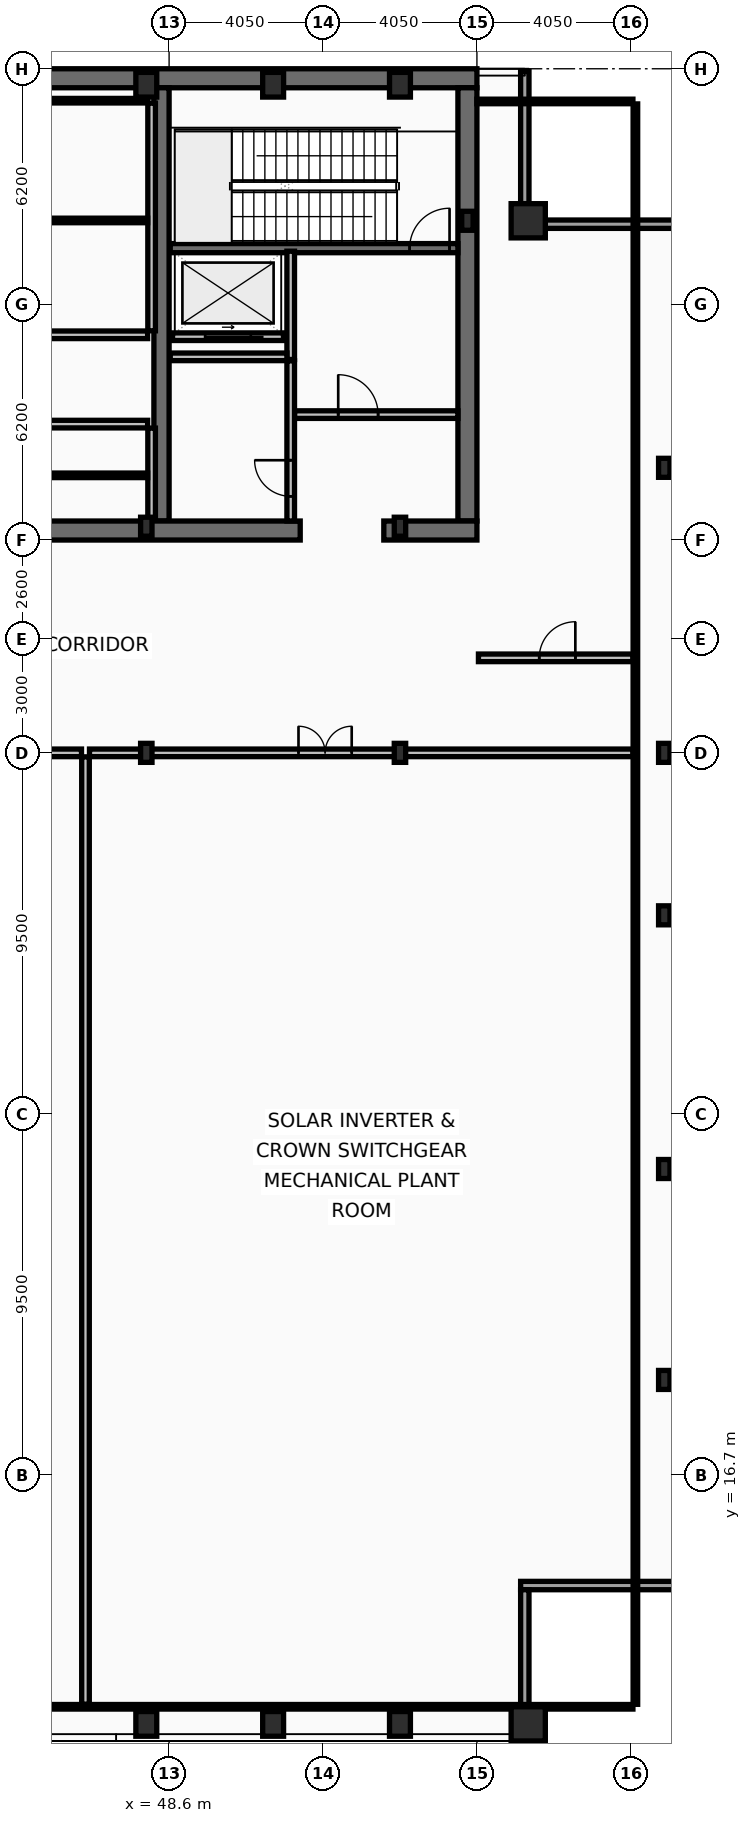
"""IFC4 building model, lengths in metres.
Left out: names, types, materials, properties, quantities, classifications, styles, units other than length and angle.
Written with IfcOpenShell. Run it as: python <this file> out.ifc"""

import sys

from ifc_helpers import new_model, si_unit, direction, frame, frame_2d, origin, origin_2d, place, context, subcontext, project, spatial, rectangle, hollow_rectangle, i_section, extrude, element, fill, save


model = new_model("IFC4")
c1 = context("Model", 3, precision=1e-05, world=origin(), true_north=direction((0.0, 1.0)))
c2 = subcontext(c1, "Body", "Model", "MODEL_VIEW")
j1 = project(units=[si_unit("LENGTHUNIT", "METRE"), si_unit("PLANEANGLEUNIT", "RADIAN")], contexts=[c1])
p1 = place(None, origin())
s1 = spatial("IfcSite", under=j1, at=p1, CompositionType="ELEMENT")
p2 = place(p1, origin())
s2 = spatial("IfcBuilding", under=s1, at=p2, CompositionType="ELEMENT")
p3 = place(p2, frame((0.0, 0.0, 373.0)))
s3 = spatial("IfcBuildingStorey", under=s2, at=p3, CompositionType="ELEMENT", Elevation=373.0)
p4 = place(p3, frame((16.2, 53.45, 0.0), z_axis=(0.0, 0.0, 1.0), x_axis=(1.0, 0.0, 0.0)))
e1 = element("IfcWall", 1, at=p4, inside=s3, PredefinedType="SHEAR", context=c2, shape_type="SweptSolid", body=[
    extrude(rectangle(XDim=40.5, YDim=0.5, at=frame_2d((20.25, 0.0))), origin(), (0.0, 0.0, 1.0), 5.4),
])
p5 = place(p3, frame((56.45, 53.2, 0.0), z_axis=(0.0, 0.0, 1.0), x_axis=(0.0, -1.0, 0.0)))
e2 = element("IfcWall", 2, at=p5, inside=s3, PredefinedType="SHEAR", context=c2, shape_type="SweptSolid", body=[
    extrude(rectangle(XDim=11.4, YDim=0.5, at=frame_2d((5.7, 0.0))), origin(), (0.0, 0.0, 1.0), 5.4),
])
p6 = place(p3, frame((48.4, 41.8, 0.0), z_axis=(0.0, 0.0, 1.0), x_axis=(0.0, 1.0, 0.0)))
e3 = element("IfcWall", 3, at=p6, inside=s3, PredefinedType="SHEAR", context=c2, shape_type="SweptSolid", body=[
    extrude(rectangle(XDim=11.4, YDim=0.4, at=frame_2d((5.7, 0.0))), origin(), (0.0, 0.0, 1.0), 5.4),
])
p7 = place(p3, frame((52.05, 41.55, 0.0), z_axis=(0.0, 0.0, 1.0), x_axis=(-1.0, 0.0, 0.0)))
e4 = element("IfcWall", 4, at=p7, inside=s3, PredefinedType="SHEAR", context=c2, shape_type="SweptSolid", body=[
    extrude(rectangle(XDim=11.3, YDim=0.5, at=frame_2d((5.65, 0.0))), origin(), (0.0, 0.0, 1.0), 5.4),
])
p8 = place(p3, frame((56.7, 41.55, 0.0), z_axis=(0.0, 0.0, 1.0), x_axis=(-1.0, 0.0, 0.0)))
e5 = element("IfcWall", 5, at=p8, inside=s3, PredefinedType="SHEAR", context=c2, shape_type="SweptSolid", body=[
    extrude(rectangle(XDim=2.45, YDim=0.5, at=frame_2d((1.225, 0.0))), origin(), (0.0, 0.0, 1.0), 5.4),
])
p9 = place(p3, frame((48.63, 48.98, 0.0), z_axis=(0.0, 0.0, 1.0), x_axis=(1.0, 0.0, 0.0)))
e6 = element("IfcWall", 6, at=p9, inside=s3, PredefinedType="SHEAR", context=c2, shape_type="SweptSolid", body=[
    extrude(rectangle(XDim=7.57, YDim=0.24, at=frame_2d((3.785, 0.0))), origin(), (0.0, 0.0, 1.0), 5.4),
])
p10 = place(p9, frame((6.3, 0.0, 0.0)))
e7 = element("IfcOpeningElement", 7, at=p10, cuts=e6, PredefinedType="OPENING", context=c2, shape_type="SweptSolid", body=[
    extrude(rectangle(XDim=1.05, YDim=2.15, at=frame_2d((0.525, 1.075))), frame((0.0, 0.13, 0.0), z_axis=(0.0, -1.0, 0.0), x_axis=(1.0, 0.0, 0.0)), (0.0, 0.0, 1.0), 0.26),
])
for number, where, z_axis, x_axis in (
    (8, (58.05, 10.15, 0.0), (0.0, 0.0, 1.0), (1.0, 0.0, 0.0)),
    (9, (58.05, 49.7, 0.0), (0.0, 0.0, 1.0), (1.0, 0.0, 0.0)),
):
    element("IfcColumn", number, at=place(p3, frame(where, z_axis=z_axis, x_axis=x_axis)), inside=s3, PredefinedType="COLUMN", context=c2, shape_type="SweptSolid", body=[
        extrude(hollow_rectangle(XDim=0.9, YDim=0.9, WallThickness=0.05, at=origin_2d()), origin(), (0.0, 0.0, 1.0), 5.6),
    ])
for number, where, z_axis, x_axis in (
    (10, (48.0, 10.15, 0.0), (0.0, 0.0, 1.0), (1.0, 0.0, 0.0)),
    (11, (51.337, 10.15, 0.0), (0.0, 0.0, 1.0), (1.0, 0.0, 0.0)),
    (12, (54.675, 10.15, 0.0), (0.0, 0.0, 1.0), (1.0, 0.0, 0.0)),
    (13, (48.0, 53.28, 0.0), (0.0, 0.0, 1.0), (1.0, 0.0, 0.0)),
    (14, (51.337, 53.28, 0.0), (0.0, 0.0, 1.0), (1.0, 0.0, 0.0)),
    (15, (54.675, 53.28, 0.0), (0.0, 0.0, 1.0), (1.0, 0.0, 0.0)),
):
    element("IfcColumn", number, at=place(p3, frame(where, z_axis=z_axis, x_axis=x_axis)), inside=s3, PredefinedType="COLUMN", context=c2, shape_type="SweptSolid", body=[
        extrude(hollow_rectangle(XDim=0.55, YDim=0.65, WallThickness=0.04, at=origin_2d()), origin(), (0.0, 0.0, 1.0), 5.6),
    ])
for number, where, z_axis, x_axis in (
    (16, (61.63, 19.2, 0.0), (0.0, 0.0, 1.0), (1.0, 0.0, 0.0)),
    (17, (61.63, 24.75, 0.0), (0.0, 0.0, 1.0), (1.0, 0.0, 0.0)),
    (18, (61.63, 31.425, 0.0), (0.0, 0.0, 1.0), (1.0, 0.0, 0.0)),
    (19, (61.63, 35.7, 0.0), (0.0, 0.0, 1.0), (1.0, 0.0, 0.0)),
    (20, (61.63, 43.2, 0.0), (0.0, 0.0, 1.0), (1.0, 0.0, 0.0)),
    (21, (56.45, 49.7, 0.0), (0.0, 0.0, 1.0), (1.0, 0.0, 0.0)),
    (22, (48.0, 35.7, 0.0), (0.0, 0.0, 1.0), (1.0, 0.0, 0.0)),
    (23, (48.0, 41.65, 0.0), (0.0, 0.0, 1.0), (1.0, 0.0, 0.0)),
    (24, (54.675, 35.7, 0.0), (0.0, 0.0, 1.0), (1.0, 0.0, 0.0)),
    (25, (54.675, 41.65, 0.0), (0.0, 0.0, 1.0), (1.0, 0.0, 0.0)),
):
    element("IfcColumn", number, at=place(p3, frame(where, z_axis=z_axis, x_axis=x_axis)), inside=s3, PredefinedType="COLUMN", context=c2, shape_type="SweptSolid", body=[
        extrude(i_section(OverallWidth=0.3, OverallDepth=0.5, WebThickness=0.014, FlangeThickness=0.028, at=origin_2d()), origin(), (0.0, 0.0, 1.0), 5.6),
    ])
p11 = place(p3, frame((57.96, 53.63, 0.0), z_axis=(0.0, 0.0, 1.0), x_axis=(0.0, -1.0, 0.0)))
e26 = element("IfcWall", 26, at=p11, inside=s3, PredefinedType="SOLIDWALL", context=c2, shape_type="SweptSolid", body=[
    extrude(rectangle(XDim=3.91, YDim=0.22, at=frame_2d((1.955, 0.0))), origin(), (0.0, 0.0, 1.0), 4.84),
])
for number, where, z_axis, x_axis in (
    (27, (57.85, 49.61, 0.0), (0.0, 0.0, 1.0), (1.0, 0.0, 0.0)),
    (28, (61.98, 13.79, 0.0), (0.0, 0.0, 1.0), (-1.0, 0.0, 0.0)),
):
    element("IfcWall", number, at=place(p3, frame(where, z_axis=z_axis, x_axis=x_axis)), inside=s3, PredefinedType="SOLIDWALL", context=c2, shape_type="SweptSolid", body=[
        extrude(rectangle(XDim=4.13, YDim=0.22, at=frame_2d((2.065, 0.0))), origin(), (0.0, 0.0, 1.0), 4.84),
    ])
p12 = place(p3, frame((57.96, 13.68, 0.0), z_axis=(0.0, 0.0, 1.0), x_axis=(0.0, -1.0, 0.0)))
e29 = element("IfcWall", 29, at=p12, inside=s3, PredefinedType="SOLIDWALL", context=c2, shape_type="SweptSolid", body=[
    extrude(rectangle(XDim=3.91, YDim=0.22, at=frame_2d((1.955, 0.0))), origin(), (0.0, 0.0, 1.0), 4.84),
])
p13 = place(p3, frame((51.61, 46.65, 0.0), z_axis=(0.0, 0.0, 1.0), x_axis=(-1.0, 0.0, 0.0)))
e30 = element("IfcWall", 30, at=p13, inside=s3, PredefinedType="PARTITIONING", context=c2, shape_type="SweptSolid", body=[
    extrude(rectangle(XDim=2.92, YDim=0.2, at=frame_2d((1.46, 0.0))), origin(), (0.0, 0.0, 1.0), 5.4),
])
p14 = place(p13, frame((0.86, 0.0, 0.0)))
e31 = element("IfcOpeningElement", 31, at=p14, cuts=e30, PredefinedType="OPENING", context=c2, shape_type="SweptSolid", body=[
    extrude(rectangle(XDim=1.2, YDim=2.18, at=frame_2d((0.6, 1.09))), frame((0.0, 0.11, 0.0), z_axis=(0.0, -1.0, 0.0), x_axis=(1.0, 0.0, 0.0)), (0.0, 0.0, 1.0), 0.22),
])
p15 = place(p3, frame((51.8, 46.05, 0.0), z_axis=(0.0, 0.0, 1.0), x_axis=(0.0, 1.0, 0.0)))
e32 = element("IfcWall", 32, at=p15, inside=s3, PredefinedType="PARTITIONING", context=c2, shape_type="SweptSolid", body=[
    extrude(rectangle(XDim=2.85, YDim=0.2, at=frame_2d((1.425, 0.0))), origin(), (0.0, 0.0, 1.0), 5.4),
])
p16 = place(p3, frame((51.9, 44.6, 0.0), z_axis=(0.0, 0.0, 1.0), x_axis=(1.0, 0.0, 0.0)))
e33 = element("IfcWall", 33, at=p16, inside=s3, PredefinedType="PARTITIONING", context=c2, shape_type="SweptSolid", body=[
    extrude(rectangle(XDim=4.3, YDim=0.2, at=frame_2d((2.15, 0.0))), origin(), (0.0, 0.0, 1.0), 5.4),
])
p17 = place(p16, frame((1.15, 0.0, 0.0)))
e34 = element("IfcOpeningElement", 34, at=p17, cuts=e33, PredefinedType="OPENING", context=c2, shape_type="SweptSolid", body=[
    extrude(rectangle(XDim=1.05, YDim=2.15, at=frame_2d((0.525, 1.075))), frame((0.0, 0.11, 0.0), z_axis=(0.0, -1.0, 0.0), x_axis=(1.0, 0.0, 0.0)), (0.0, 0.0, 1.0), 0.22),
])
p18 = place(p3, frame((48.63, 46.12, 0.0), z_axis=(0.0, 0.0, 1.0), x_axis=(1.0, 0.0, 0.0)))
e35 = element("IfcWall", 35, at=p18, inside=s3, PredefinedType="PARTITIONING", context=c2, shape_type="SweptSolid", body=[
    extrude(rectangle(XDim=3.07, YDim=0.2, at=frame_2d((1.535, 0.0))), origin(), (0.0, 0.0, 1.0), 5.4),
])
p19 = place(p3, frame((51.8, 41.8, 0.0), z_axis=(0.0, 0.0, 1.0), x_axis=(0.0, 1.0, 0.0)))
e36 = element("IfcWall", 36, at=p19, inside=s3, PredefinedType="PARTITIONING", context=c2, shape_type="SweptSolid", body=[
    extrude(rectangle(XDim=4.215, YDim=0.2, at=frame_2d((2.107, 0.0))), origin(), (0.0, 0.0, 1.0), 5.4),
])
p20 = place(p19, frame((0.65, 0.0, 0.0)))
e37 = element("IfcOpeningElement", 37, at=p20, cuts=e36, PredefinedType="OPENING", context=c2, shape_type="SweptSolid", body=[
    extrude(rectangle(XDim=0.95, YDim=2.1, at=frame_2d((0.475, 1.05))), frame((0.0, 0.11, 0.0), z_axis=(0.0, -1.0, 0.0), x_axis=(1.0, 0.0, 0.0)), (0.0, 0.0, 1.0), 0.22),
])
p21 = place(p3, frame((48.14, 46.805, 0.0), z_axis=(0.0, 0.0, 1.0), x_axis=(0.0, 1.0, 0.0)))
e38 = element("IfcWall", 38, at=p21, inside=s3, PredefinedType="PARTITIONING", context=c2, shape_type="SweptSolid", body=[
    extrude(rectangle(XDim=5.99, YDim=0.2, at=frame_2d((2.995, 0.0))), origin(), (0.0, 0.0, 1.0), 5.4),
])
p22 = place(p3, frame((40.685, 52.86, 0.0), z_axis=(0.0, 0.0, 1.0), x_axis=(1.0, 0.0, 0.0)))
e39 = element("IfcWall", 39, at=p22, inside=s3, PredefinedType="PARTITIONING", context=c2, shape_type="SweptSolid", body=[
    extrude(rectangle(XDim=7.35, YDim=0.12, at=frame_2d((3.675, 0.0))), origin(), (0.0, 0.0, 1.0), 5.4),
])
p23 = place(p3, frame((40.685, 49.709, 0.0), z_axis=(0.0, 0.0, 1.0), x_axis=(1.0, 0.0, 0.0)))
e40 = element("IfcWall", 40, at=p23, inside=s3, PredefinedType="PARTITIONING", context=c2, shape_type="SweptSolid", body=[
    extrude(rectangle(XDim=7.35, YDim=0.12, at=frame_2d((3.675, 0.0))), origin(), (0.0, 0.0, 1.0), 5.4),
])
p24 = place(p23, frame((2.4, 0.0, 0.0)))
e41 = element("IfcOpeningElement", 41, at=p24, cuts=e40, PredefinedType="OPENING", context=c2, shape_type="SweptSolid", body=[
    extrude(rectangle(XDim=0.9, YDim=2.05, at=frame_2d((0.45, 1.025))), frame((0.0, 0.07, 0.0), z_axis=(0.0, -1.0, 0.0), x_axis=(1.0, 0.0, 0.0)), (0.0, 0.0, 1.0), 0.14),
])
p25 = place(p3, frame((40.685, 46.7, 0.0), z_axis=(0.0, 0.0, 1.0), x_axis=(1.0, 0.0, 0.0)))
e42 = element("IfcWall", 42, at=p25, inside=s3, PredefinedType="PARTITIONING", context=c2, shape_type="SweptSolid", body=[
    extrude(rectangle(XDim=7.35, YDim=0.2, at=frame_2d((3.675, 0.0))), origin(), (0.0, 0.0, 1.0), 5.4),
])
p26 = place(p25, frame((2.4, 0.0, 0.0)))
e43 = element("IfcOpeningElement", 43, at=p26, cuts=e42, PredefinedType="OPENING", context=c2, shape_type="SweptSolid", body=[
    extrude(rectangle(XDim=0.95, YDim=2.1, at=frame_2d((0.475, 1.05))), frame((0.0, 0.11, 0.0), z_axis=(0.0, -1.0, 0.0), x_axis=(1.0, 0.0, 0.0)), (0.0, 0.0, 1.0), 0.22),
])
p27 = place(p3, frame((48.14, 41.85, 0.0), z_axis=(0.0, 0.0, 1.0), x_axis=(0.0, 1.0, 0.0)))
e44 = element("IfcWall", 44, at=p27, inside=s3, PredefinedType="PARTITIONING", context=c2, shape_type="SweptSolid", body=[
    extrude(rectangle(XDim=2.395, YDim=0.2, at=frame_2d((1.198, 0.0))), origin(), (0.0, 0.0, 1.0), 5.4),
])
p28 = place(p3, frame((40.755, 43.002, 0.0), z_axis=(0.0, 0.0, 1.0), x_axis=(1.0, 0.0, 0.0)))
e45 = element("IfcWall", 45, at=p28, inside=s3, PredefinedType="PARTITIONING", context=c2, shape_type="SweptSolid", body=[
    extrude(rectangle(XDim=7.28, YDim=0.12, at=frame_2d((3.64, 0.0))), origin(), (0.0, 0.0, 1.0), 5.4),
])
p29 = place(p28, frame((2.4, 0.0, 0.0)))
e46 = element("IfcOpeningElement", 46, at=p29, cuts=e45, PredefinedType="OPENING", context=c2, shape_type="SweptSolid", body=[
    extrude(rectangle(XDim=0.9, YDim=2.05, at=frame_2d((0.45, 1.025))), frame((0.0, 0.07, 0.0), z_axis=(0.0, -1.0, 0.0), x_axis=(1.0, 0.0, 0.0)), (0.0, 0.0, 1.0), 0.14),
])
p30 = place(p3, frame((40.755, 44.35, 0.0), z_axis=(0.0, 0.0, 1.0), x_axis=(1.0, 0.0, 0.0)))
e47 = element("IfcWall", 47, at=p30, inside=s3, PredefinedType="PARTITIONING", context=c2, shape_type="SweptSolid", body=[
    extrude(rectangle(XDim=7.28, YDim=0.2, at=frame_2d((3.64, 0.0))), origin(), (0.0, 0.0, 1.0), 5.4),
])
p31 = place(p30, frame((2.4, 0.0, 0.0)))
e48 = element("IfcOpeningElement", 48, at=p31, cuts=e47, PredefinedType="OPENING", context=c2, shape_type="SweptSolid", body=[
    extrude(rectangle(XDim=0.95, YDim=2.1, at=frame_2d((0.475, 1.05))), frame((0.0, 0.11, 0.0), z_axis=(0.0, -1.0, 0.0), x_axis=(1.0, 0.0, 0.0)), (0.0, 0.0, 1.0), 0.22),
])
p32 = place(p3, frame((26.605, 35.7, 0.0), z_axis=(0.0, 0.0, 1.0), x_axis=(1.0, 0.0, 0.0)))
e49 = element("IfcWall", 49, at=p32, inside=s3, PredefinedType="PARTITIONING", context=c2, shape_type="SweptSolid", body=[
    extrude(rectangle(XDim=19.69, YDim=0.2, at=frame_2d((9.845, 0.0))), origin(), (0.0, 0.0, 1.0), 5.03),
])
p33 = place(p32, frame((8.5, 0.0, 0.0)))
e50 = element("IfcOpeningElement", 50, at=p33, cuts=e49, PredefinedType="OPENING", context=c2, shape_type="SweptSolid", body=[
    extrude(rectangle(XDim=1.4, YDim=2.15, at=frame_2d((0.7, 1.075))), frame((0.0, 0.11, 0.0), z_axis=(0.0, -1.0, 0.0), x_axis=(1.0, 0.0, 0.0)), (0.0, 0.0, 1.0), 0.22),
])
p34 = place(p3, frame((46.505, 35.7, 0.0), z_axis=(0.0, 0.0, 1.0), x_axis=(1.0, 0.0, 0.0)))
e51 = element("IfcWall", 51, at=p34, inside=s3, PredefinedType="PARTITIONING", context=c2, shape_type="SweptSolid", body=[
    extrude(rectangle(XDim=14.3, YDim=0.2, at=frame_2d((7.15, 0.0))), origin(), (0.0, 0.0, 1.0), 4.79),
])
p35 = place(p34, frame((5.5, 0.0, 0.0)))
e52 = element("IfcOpeningElement", 52, at=p35, cuts=e51, PredefinedType="OPENING", context=c2, shape_type="SweptSolid", body=[
    extrude(rectangle(XDim=1.4, YDim=2.15, at=frame_2d((0.7, 1.075))), frame((0.0, 0.11, 0.0), z_axis=(0.0, -1.0, 0.0), x_axis=(1.0, 0.0, 0.0)), (0.0, 0.0, 1.0), 0.22),
])
p36 = place(p3, frame((46.4, 10.665, 0.0), z_axis=(0.0, 0.0, 1.0), x_axis=(0.0, 1.0, 0.0)))
e53 = element("IfcWall", 53, at=p36, inside=s3, PredefinedType="PARTITIONING", context=c2, shape_type="SweptSolid", body=[
    extrude(rectangle(XDim=24.93, YDim=0.2, at=frame_2d((12.465, 0.0))), origin(), (0.0, 0.0, 1.0), 5.03),
])
p37 = place(p3, frame((56.74, 38.2, 0.0), z_axis=(0.0, 0.0, 1.0), x_axis=(1.0, 0.0, 0.0)))
e54 = element("IfcWall", 54, at=p37, inside=s3, PredefinedType="PARTITIONING", context=c2, shape_type="SweptSolid", body=[
    extrude(rectangle(XDim=4.065, YDim=0.2, at=frame_2d((2.032, 0.0))), origin(), (0.0, 0.0, 1.0), 5.4),
])
p38 = place(p37, frame((1.6, 0.0, 0.0)))
e55 = element("IfcOpeningElement", 55, at=p38, cuts=e54, PredefinedType="OPENING", context=c2, shape_type="SweptSolid", body=[
    extrude(rectangle(XDim=0.95, YDim=2.1, at=frame_2d((0.475, 1.05))), frame((0.0, 0.11, 0.0), z_axis=(0.0, -1.0, 0.0), x_axis=(1.0, 0.0, 0.0)), (0.0, 0.0, 1.0), 0.22),
])
p39 = place(p3, frame((60.87, 10.665, 0.0), z_axis=(0.0, 0.0, 1.0), x_axis=(0.0, 1.0, 0.0)))
e56 = element("IfcWall", 56, at=p39, inside=s3, PredefinedType="PARTITIONING", context=c2, shape_type="SweptSolid", body=[
    extrude(rectangle(XDim=42.11, YDim=0.12, at=frame_2d((21.055, 0.0))), origin(), (0.0, 0.0, 1.0), 4.79),
])
p40 = place(p3, frame((56.7, 52.84, 0.0), z_axis=(0.0, 0.0, 1.0), x_axis=(1.0, 0.0, 0.0)))
e57 = element("IfcWall", 57, at=p40, inside=s3, PredefinedType="PARTITIONING", context=c2, shape_type="SweptSolid", body=[
    extrude(rectangle(XDim=4.105, YDim=0.12, at=frame_2d((2.052, 0.0))), origin(), (0.0, 0.0, 1.0), 5.4),
])
p41 = place(p3, frame((12.095, 10.6, 0.0), z_axis=(0.0, 0.0, 1.0), x_axis=(1.0, 0.0, 0.0)))
e58 = element("IfcWall", 58, at=p41, inside=s3, PredefinedType="PARTITIONING", context=c2, shape_type="SweptSolid", body=[
    extrude(rectangle(XDim=48.71, YDim=0.12, at=frame_2d((24.355, 0.0))), origin(), (0.0, 0.0, 1.0), 4.79),
])
p42 = place(p10, origin())
e59 = element("IfcDoor", 59, at=p42, inside=s3, OperationType="SINGLE_SWING_RIGHT", PredefinedType="DOOR", context=c2, shape_type="SweptSolid", body=[
    extrude(rectangle(XDim=1.05, YDim=2.15, at=frame_2d((0.525, 1.075))), frame((0.0, 0.025, 0.0), z_axis=(0.0, -1.0, 0.0), x_axis=(1.0, 0.0, 0.0)), (0.0, 0.0, 1.0), 0.05),
])
fill(e7, e59)
p43 = place(p14, origin())
e60 = element("IfcDoor", 60, at=p43, inside=s3, OperationType="SLIDING_TO_LEFT", PredefinedType="DOOR", context=c2, shape_type="SweptSolid", body=[
    extrude(rectangle(XDim=1.2, YDim=2.18, at=frame_2d((0.6, 1.09))), frame((0.0, 0.025, 0.0), z_axis=(0.0, -1.0, 0.0), x_axis=(1.0, 0.0, 0.0)), (0.0, 0.0, 1.0), 0.05),
])
fill(e31, e60)
p44 = place(p17, origin())
e61 = element("IfcDoor", 61, at=p44, inside=s3, OperationType="SINGLE_SWING_LEFT", PredefinedType="DOOR", context=c2, shape_type="SweptSolid", body=[
    extrude(rectangle(XDim=1.05, YDim=2.15, at=frame_2d((0.525, 1.075))), frame((0.0, 0.025, 0.0), z_axis=(0.0, -1.0, 0.0), x_axis=(1.0, 0.0, 0.0)), (0.0, 0.0, 1.0), 0.05),
])
fill(e34, e61)
p45 = place(p20, origin())
e62 = element("IfcDoor", 62, at=p45, inside=s3, OperationType="SINGLE_SWING_RIGHT", PredefinedType="DOOR", context=c2, shape_type="SweptSolid", body=[
    extrude(rectangle(XDim=0.95, YDim=2.1, at=frame_2d((0.475, 1.05))), frame((0.0, 0.025, 0.0), z_axis=(0.0, -1.0, 0.0), x_axis=(1.0, 0.0, 0.0)), (0.0, 0.0, 1.0), 0.05),
])
fill(e37, e62)
p46 = place(p35, origin())
e63 = element("IfcDoor", 63, at=p46, inside=s3, OperationType="DOUBLE_DOOR_SINGLE_SWING", PredefinedType="DOOR", context=c2, shape_type="SweptSolid", body=[
    extrude(rectangle(XDim=1.4, YDim=2.15, at=frame_2d((0.7, 1.075))), frame((0.0, 0.025, 0.0), z_axis=(0.0, -1.0, 0.0), x_axis=(1.0, 0.0, 0.0)), (0.0, 0.0, 1.0), 0.05),
])
fill(e52, e63)
p47 = place(p38, origin())
e64 = element("IfcDoor", 64, at=p47, inside=s3, OperationType="SINGLE_SWING_RIGHT", PredefinedType="DOOR", context=c2, shape_type="SweptSolid", body=[
    extrude(rectangle(XDim=0.95, YDim=2.1, at=frame_2d((0.475, 1.05))), frame((0.0, 0.025, 0.0), z_axis=(0.0, -1.0, 0.0), x_axis=(1.0, 0.0, 0.0)), (0.0, 0.0, 1.0), 0.05),
])
fill(e55, e64)
save(model, sys.argv[1])
